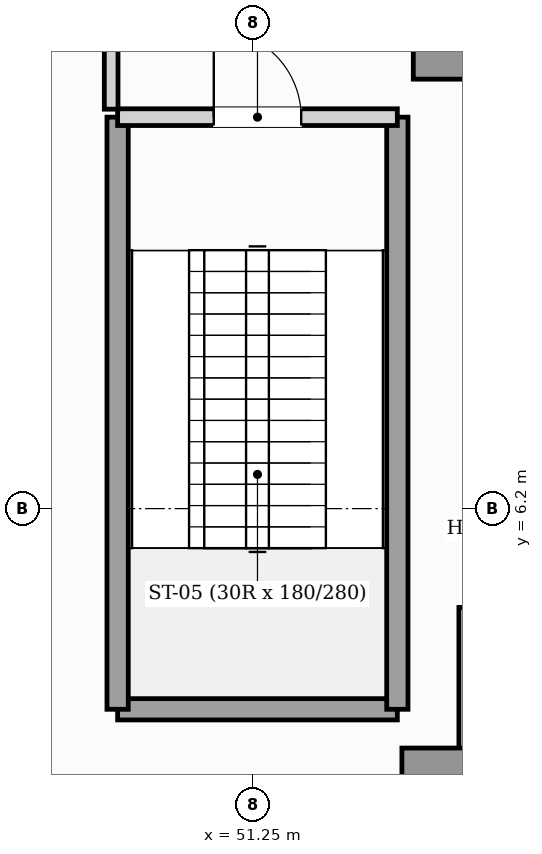
"""IFC4 building model, lengths in metres.
Left out: names, types, materials, properties, quantities, classifications, styles, units other than length and angle.
Written with IfcOpenShell. Run it as: python <this file> out.ifc"""

import sys

from ifc_helpers import new_model, si_unit, direction, frame, frame_2d, origin, origin_2d, place, context, subcontext, project, spatial, rectangle, hollow_rectangle, extrude, element, fill, save


model = new_model("IFC4")
c1 = context("Model", 3, precision=1e-05, world=origin(), true_north=direction((0.0, 1.0)))
c2 = subcontext(c1, "Body", "Model", "MODEL_VIEW")
j1 = project(units=[si_unit("LENGTHUNIT", "METRE"), si_unit("PLANEANGLEUNIT", "RADIAN")], contexts=[c1])
p1 = place(None, origin())
s1 = spatial("IfcSite", under=j1, at=p1, CompositionType="ELEMENT")
p2 = place(p1, origin())
s2 = spatial("IfcBuilding", under=s1, at=p2, CompositionType="ELEMENT")
p3 = place(p2, origin())
s3 = spatial("IfcBuildingStorey", under=s2, at=p3, CompositionType="ELEMENT", Elevation=0.0)
p4 = place(p3, frame((53.9, 2.35, 0.0), z_axis=(0.0, 0.0, 1.0), x_axis=(1.0, 0.0, 0.0)))
e1 = element("IfcColumn", 1, at=p4, inside=s3, PredefinedType="USERDEFINED", context=c2, shape_type="SweptSolid", body=[
    extrude(hollow_rectangle(XDim=1.4, YDim=1.4, WallThickness=0.08, at=origin_2d()), origin(), (0.0, 0.0, 1.0), 5.4),
])
p5 = place(p3, frame((53.9, 12.4, 0.0), z_axis=(0.0, 0.0, 1.0), x_axis=(1.0, 0.0, 0.0)))
e2 = element("IfcColumn", 2, at=p5, inside=s3, PredefinedType="COLUMN", context=c2, shape_type="SweptSolid", body=[
    extrude(rectangle(XDim=1.1, YDim=1.1, at=origin_2d()), origin(), (0.0, 0.0, 1.0), 5.4),
])
p6 = place(p3, frame((54.06, 2.2, 0.0), z_axis=(0.0, 0.0, 1.0), x_axis=(0.0, 1.0, 0.0)))
e3 = element("IfcWall", 3, at=p6, inside=s3, PredefinedType="SOLIDWALL", context=c2, shape_type="SweptSolid", body=[
    extrude(rectangle(XDim=2.7, YDim=0.22, at=frame_2d((1.35, 0.0))), origin(), (0.0, 0.0, 1.0), 4.483),
])
p7 = place(p3, frame((49.46, 3.56, 0.0), z_axis=(0.0, 0.0, 1.0), x_axis=(1.0, 0.0, 0.0)))
e4 = element("IfcWall", 4, at=p7, inside=s3, PredefinedType="SHEAR", context=c2, shape_type="SweptSolid", body=[
    extrude(rectangle(XDim=3.68, YDim=0.28, at=frame_2d((1.84, 0.0))), origin(), (0.0, 0.0, 1.0), 5.1),
])
for number, where, z_axis, x_axis in (
    (5, (49.46, 3.56, 0.0), (0.0, 0.0, 1.0), (0.0, 1.0, 0.0)),
    (6, (53.14, 3.56, 0.0), (0.0, 0.0, 1.0), (0.0, 1.0, 0.0)),
):
    element("IfcWall", number, at=place(p3, frame(where, z_axis=z_axis, x_axis=x_axis)), inside=s3, PredefinedType="SHEAR", context=c2, shape_type="SweptSolid", body=[
        extrude(rectangle(XDim=7.79, YDim=0.28, at=frame_2d((3.895, 0.0))), origin(), (0.0, 0.0, 1.0), 5.1),
    ])
p8 = place(p3, frame((49.46, 11.35, 0.0), z_axis=(0.0, 0.0, 1.0), x_axis=(1.0, 0.0, 0.0)))
e7 = element("IfcWall", 7, at=p8, inside=s3, PredefinedType="SOLIDWALL", context=c2, shape_type="SweptSolid", body=[
    extrude(rectangle(XDim=3.68, YDim=0.22, at=frame_2d((1.84, 0.0))), origin(), (0.0, 0.0, 1.0), 5.1),
])
p9 = place(p8, frame((1.265, 0.0, 0.0)))
e8 = element("IfcOpeningElement", 8, at=p9, cuts=e7, PredefinedType="OPENING", context=c2, shape_type="SweptSolid", body=[
    extrude(rectangle(XDim=1.15, YDim=2.2, at=frame_2d((0.575, 1.1))), frame((0.0, 0.12, 0.0), z_axis=(0.0, -1.0, 0.0), x_axis=(1.0, 0.0, 0.0)), (0.0, 0.0, 1.0), 0.24),
])
p10 = place(p3, frame((49.375, 11.455, 0.0), z_axis=(0.0, 0.0, 1.0), x_axis=(0.0, 1.0, 0.0)))
e9 = element("IfcWall", 9, at=p10, inside=s3, PredefinedType="PARTITIONING", context=c2, shape_type="SweptSolid", body=[
    extrude(rectangle(XDim=3.49, YDim=0.18, at=frame_2d((1.745, 0.0))), origin(), (0.0, 0.0, 1.0), 5.1),
])
p11 = place(p10, frame((1.245, 0.0, 0.0)))
e10 = element("IfcOpeningElement", 10, at=p11, cuts=e9, PredefinedType="OPENING", context=c2, shape_type="SweptSolid", body=[
    extrude(rectangle(XDim=1.0, YDim=2.15, at=frame_2d((0.5, 1.075))), frame((0.0, 0.1, 0.0), z_axis=(0.0, -1.0, 0.0), x_axis=(1.0, 0.0, 0.0)), (0.0, 0.0, 1.0), 0.2),
])
p12 = place(p9, origin())
e11 = element("IfcDoor", 11, at=p12, inside=s3, OperationType="SINGLE_SWING_LEFT", PredefinedType="DOOR", context=c2, shape_type="SweptSolid", body=[
    extrude(rectangle(XDim=1.15, YDim=2.2, at=frame_2d((0.575, 1.1))), frame((0.0, 0.025, 0.0), z_axis=(0.0, -1.0, 0.0), x_axis=(1.0, 0.0, 0.0)), (0.0, 0.0, 1.0), 0.05),
])
fill(e8, e11)
save(model, sys.argv[1])
